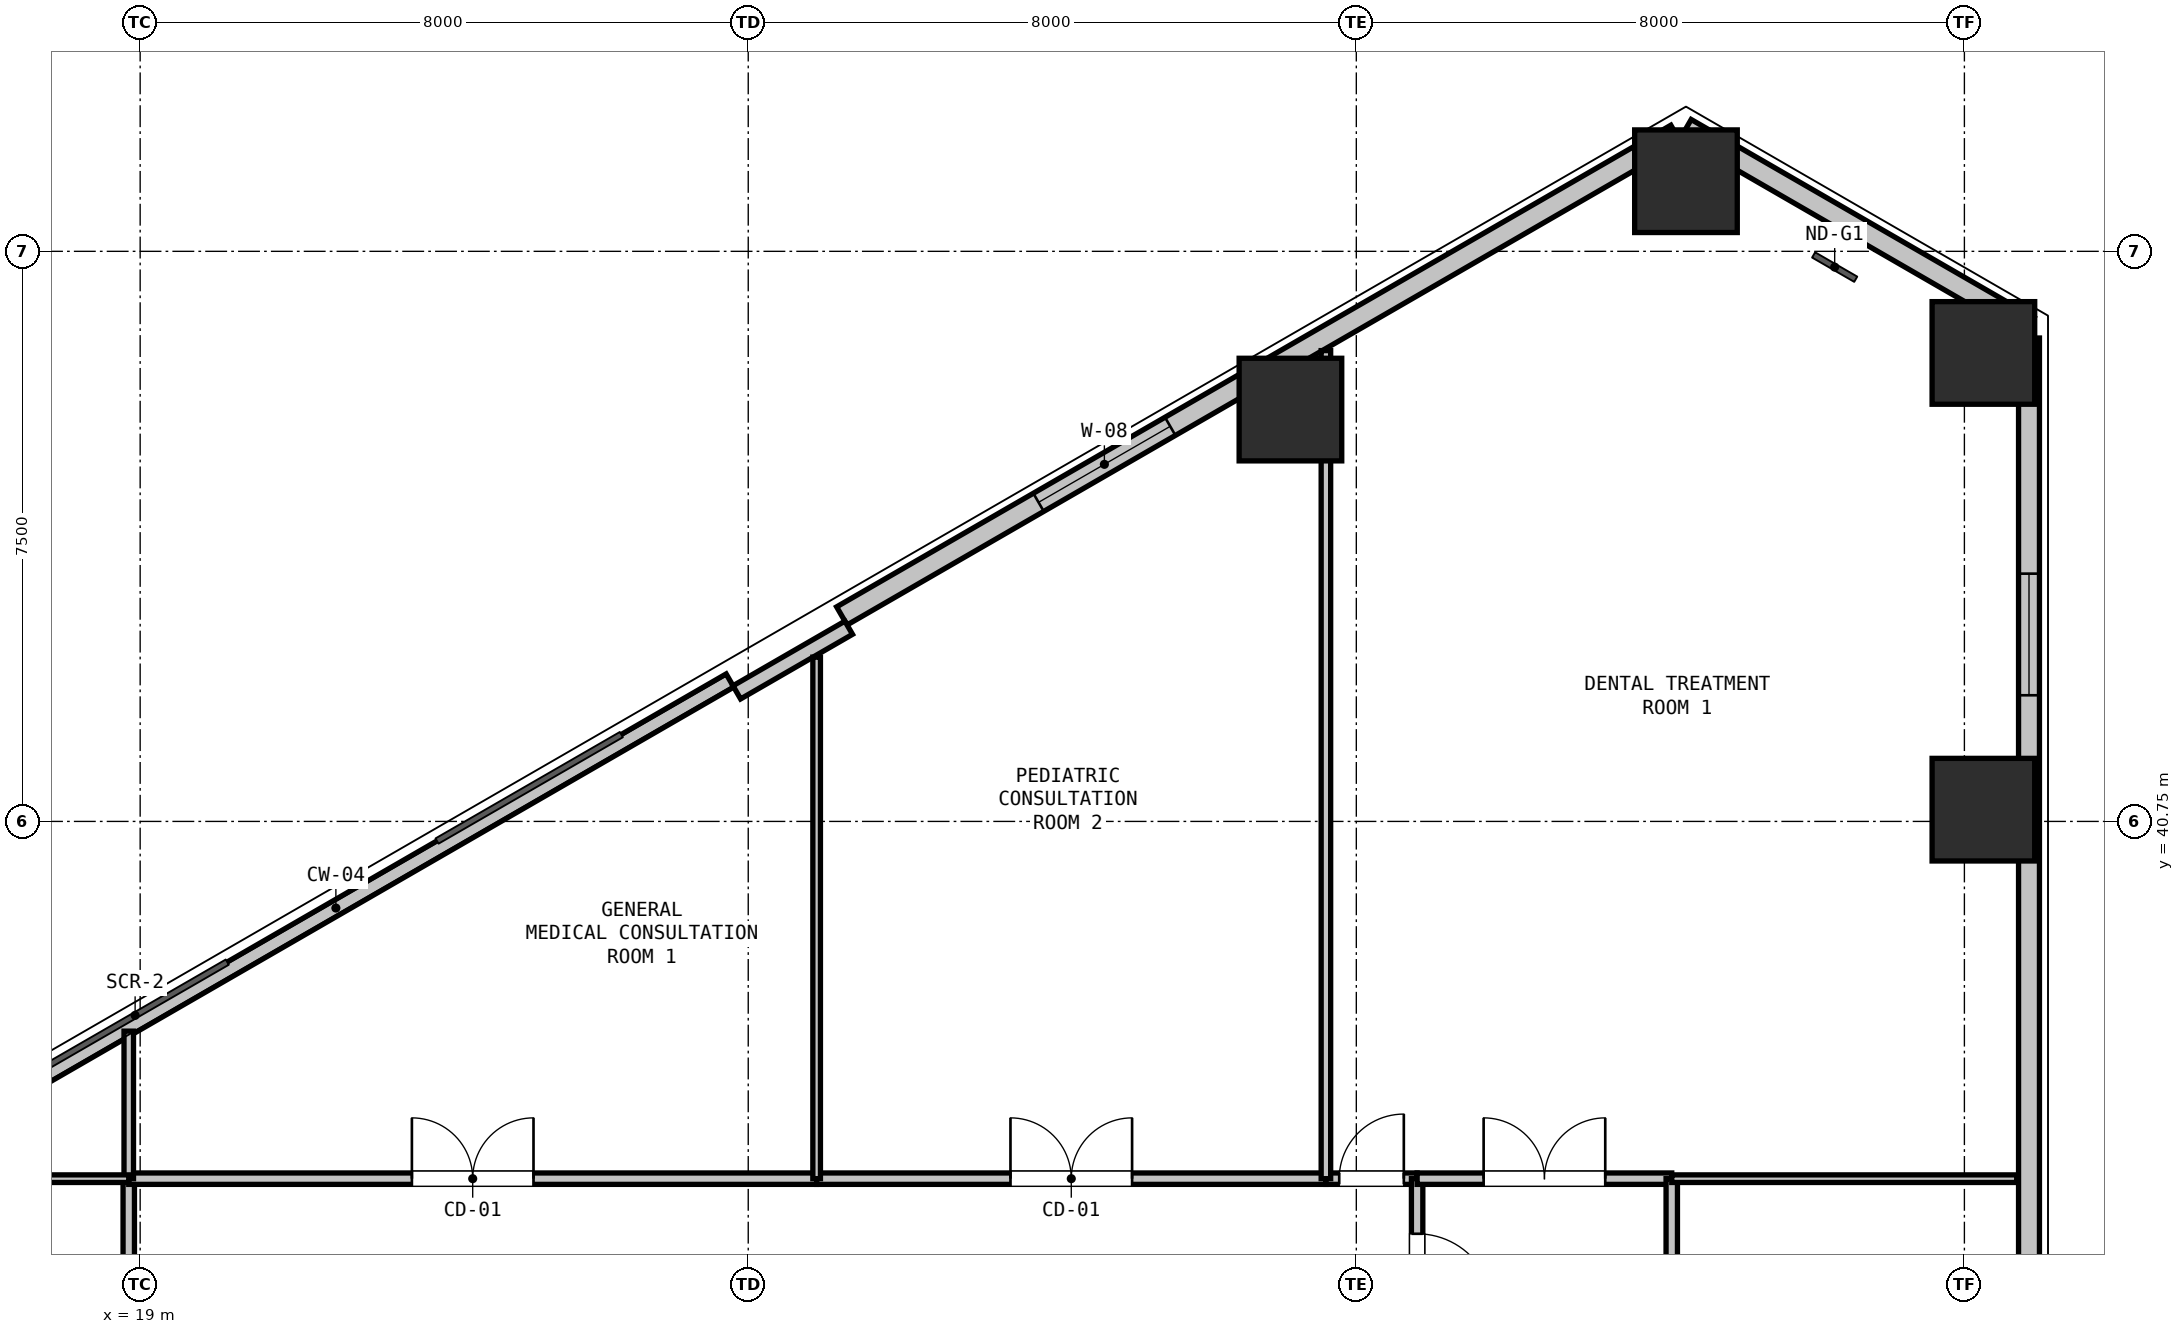
"""IFC4 building model, lengths in metres.
Left out: names, types, materials, properties, quantities, classifications, styles, units other than length and angle.
Written with IfcOpenShell. Run it as: python <this file> out.ifc"""

import sys

from ifc_helpers import new_model, si_unit, direction, frame, frame_2d, origin, origin_2d, place, context, subcontext, project, spatial, rectangle, hollow_rectangle, extrude, element, fill, save


model = new_model("IFC4")
c1 = context("Model", 3, precision=1e-05, world=origin(), true_north=direction((0.0, 1.0)))
c2 = subcontext(c1, "Body", "Model", "MODEL_VIEW")
j1 = project(units=[si_unit("LENGTHUNIT", "METRE"), si_unit("PLANEANGLEUNIT", "RADIAN")], contexts=[c1])
p1 = place(None, origin())
s1 = spatial("IfcSite", under=j1, at=p1, CompositionType="ELEMENT")
p2 = place(p1, origin())
s2 = spatial("IfcBuilding", under=s1, at=p2, CompositionType="ELEMENT")
p3 = place(p2, frame((0.0, 0.0, 14.4)))
s3 = spatial("IfcBuildingStorey", under=s2, at=p3, CompositionType="ELEMENT", Elevation=14.4)
for number, where, z_axis, x_axis in (
    (1, (34.133, 46.168, 0.0), (0.0, 0.0, 1.0), (1.0, 0.0, 0.0)),
    (2, (39.337, 49.173, 0.0), (0.0, 0.0, 1.0), (1.0, 0.0, 0.0)),
    (3, (43.25, 46.913, 0.0), (0.0, 0.0, 1.0), (1.0, 0.0, 0.0)),
    (4, (43.25, 40.905, 0.0), (0.0, 0.0, 1.0), (1.0, 0.0, 0.0)),
):
    element("IfcColumn", number, at=place(p3, frame(where, z_axis=z_axis, x_axis=x_axis)), inside=s3, PredefinedType="COLUMN", context=c2, shape_type="SweptSolid", body=[
        extrude(hollow_rectangle(XDim=1.35, YDim=1.35, WallThickness=0.036, at=origin_2d()), origin(), (0.0, 0.0, 1.0), 4.8),
    ])
p4 = place(p3, frame((39.337, 49.865, 0.0), z_axis=(0.0, 0.0, 1.0), x_axis=(0.866043601342, -0.499968479581, 0.0)))
e5 = element("IfcWall", 5, at=p4, inside=s3, PredefinedType="SOLIDWALL", context=c2, shape_type="SweptSolid", body=[
    extrude(rectangle(XDim=5.211, YDim=0.275, at=frame_2d((2.605, 0.0))), origin(), (0.0, 0.0, 1.0), 4.14),
])
p5 = place(p3, frame((16.39, 36.617, 0.0), z_axis=(0.0, 0.0, 1.0), x_axis=(0.866027351828, 0.499996625875, 0.0)))
e6 = element("IfcWall", 6, at=p5, inside=s3, PredefinedType="PARAPET", context=c2, shape_type="SweptSolid", body=[
    extrude(rectangle(XDim=11.973, YDim=0.2, at=frame_2d((5.987, 0.0))), origin(), (0.0, 0.0, 1.0), 0.2),
])
p6 = place(p3, frame((28.232, 43.454, 0.0), z_axis=(0.0, 0.0, 1.0), x_axis=(0.86603192154, 0.499988710747, 0.0)))
e7 = element("IfcWall", 7, at=p6, inside=s3, PredefinedType="SOLIDWALL", context=c2, shape_type="SweptSolid", body=[
    extrude(rectangle(XDim=12.673, YDim=0.275, at=frame_2d((6.336, 0.0))), origin(), (0.0, 0.0, 1.0), 4.14),
])
p7 = place(p6, frame((2.988, 0.0, 0.9)))
e8 = element("IfcOpeningElement", 8, at=p7, cuts=e7, PredefinedType="OPENING", context=c2, shape_type="SweptSolid", body=[
    extrude(rectangle(XDim=2.0, YDim=1.8, at=frame_2d((1.0, 0.9))), frame((0.0, 0.147, 0.0), z_axis=(0.0, -1.0, 0.0), x_axis=(1.0, 0.0, 0.0)), (0.0, 0.0, 1.0), 0.295),
])
p8 = place(p3, frame((26.85, 42.448, 0.0), z_axis=(0.0, 0.0, 1.0), x_axis=(0.86605165483, 0.499954529098, 0.0)))
e9 = element("IfcWall", 9, at=p8, inside=s3, PredefinedType="PARAPET", context=c2, shape_type="SweptSolid", body=[
    extrude(rectangle(XDim=1.7, YDim=0.2, at=frame_2d((0.85, 0.0))), origin(), (0.0, 0.0, 1.0), 4.14),
])
p9 = place(p3, frame((43.85, 47.11, 0.0), z_axis=(0.0, 0.0, 1.0), x_axis=(0.0, -1.0, 0.0)))
e10 = element("IfcWall", 10, at=p9, inside=s3, PredefinedType="SOLIDWALL", context=c2, shape_type="SweptSolid", body=[
    extrude(rectangle(XDim=12.673, YDim=0.275, at=frame_2d((6.336, 0.0))), origin(), (0.0, 0.0, 1.0), 4.14),
])
p10 = place(p9, frame((3.1, 0.0, 0.9)))
e11 = element("IfcOpeningElement", 11, at=p10, cuts=e10, PredefinedType="OPENING", context=c2, shape_type="SweptSolid", body=[
    extrude(rectangle(XDim=1.6, YDim=1.8, at=frame_2d((0.8, 0.9))), frame((0.0, 0.147, 0.0), z_axis=(0.0, -1.0, 0.0), x_axis=(1.0, 0.0, 0.0)), (0.0, 0.0, 1.0), 0.295),
])
p11 = place(p3, frame((18.85, 27.2, 0.0), z_axis=(0.0, 0.0, 1.0), x_axis=(0.0, 1.0, 0.0)))
e12 = element("IfcWall", 12, at=p11, inside=s3, PredefinedType="PARTITIONING", context=c2, shape_type="SweptSolid", body=[
    extrude(rectangle(XDim=8.85, YDim=0.15, at=frame_2d((4.425, 0.0))), origin(), (0.0, 0.0, 1.0), 3.818),
])
p12 = place(p11, frame((3.925, 0.0, 0.0)))
e13 = element("IfcOpeningElement", 13, at=p12, cuts=e12, PredefinedType="OPENING", context=c2, shape_type="SweptSolid", body=[
    extrude(rectangle(XDim=1.0, YDim=2.15, at=frame_2d((0.5, 1.075))), frame((0.0, 0.085, 0.0), z_axis=(0.0, -1.0, 0.0), x_axis=(1.0, 0.0, 0.0)), (0.0, 0.0, 1.0), 0.17),
])
p13 = place(p3, frame((18.85, 36.05, 0.0), z_axis=(0.0, 0.0, 1.0), x_axis=(1.0, 0.0, 0.0)))
e14 = element("IfcWall", 14, at=p13, inside=s3, PredefinedType="PARTITIONING", context=c2, shape_type="SweptSolid", body=[
    extrude(rectangle(XDim=9.05, YDim=0.15, at=frame_2d((4.525, 0.0))), origin(), (0.0, 0.0, 1.0), 4.52),
])
p14 = place(p13, frame((3.725, 0.0, 0.0)))
e15 = element("IfcOpeningElement", 15, at=p14, cuts=e14, PredefinedType="OPENING", context=c2, shape_type="SweptSolid", body=[
    extrude(rectangle(XDim=1.6, YDim=2.2, at=frame_2d((0.8, 1.1))), frame((0.0, 0.085, 0.0), z_axis=(0.0, -1.0, 0.0), x_axis=(1.0, 0.0, 0.0)), (0.0, 0.0, 1.0), 0.17),
])
p15 = place(p3, frame((27.9, 36.05, 0.0), z_axis=(0.0, 0.0, 1.0), x_axis=(1.0, 0.0, 0.0)))
e16 = element("IfcWall", 16, at=p15, inside=s3, PredefinedType="PARTITIONING", context=c2, shape_type="SweptSolid", body=[
    extrude(rectangle(XDim=6.7, YDim=0.15, at=frame_2d((3.35, 0.0))), origin(), (0.0, 0.0, 1.0), 4.52),
])
p16 = place(p15, frame((2.55, 0.0, 0.0)))
e17 = element("IfcOpeningElement", 17, at=p16, cuts=e16, PredefinedType="OPENING", context=c2, shape_type="SweptSolid", body=[
    extrude(rectangle(XDim=1.6, YDim=2.2, at=frame_2d((0.8, 1.1))), frame((0.0, 0.085, 0.0), z_axis=(0.0, -1.0, 0.0), x_axis=(1.0, 0.0, 0.0)), (0.0, 0.0, 1.0), 0.17),
])
p17 = place(p3, frame((34.6, 36.05, 0.0), z_axis=(0.0, 0.0, 1.0), x_axis=(1.0, 0.0, 0.0)))
e18 = element("IfcWall", 18, at=p17, inside=s3, PredefinedType="PARTITIONING", context=c2, shape_type="SweptSolid", body=[
    extrude(rectangle(XDim=1.2, YDim=0.15, at=frame_2d((0.6, 0.0))), origin(), (0.0, 0.0, 1.0), 4.52),
])
p18 = place(p17, frame((0.175, 0.0, 0.0)))
e19 = element("IfcOpeningElement", 19, at=p18, cuts=e18, PredefinedType="OPENING", context=c2, shape_type="SweptSolid", body=[
    extrude(rectangle(XDim=0.85, YDim=2.1, at=frame_2d((0.425, 1.05))), frame((0.0, 0.085, 0.0), z_axis=(0.0, -1.0, 0.0), x_axis=(1.0, 0.0, 0.0)), (0.0, 0.0, 1.0), 0.17),
])
p19 = place(p3, frame((35.8, 36.05, 0.0), z_axis=(0.0, 0.0, 1.0), x_axis=(0.0, -1.0, 0.0)))
e20 = element("IfcWall", 20, at=p19, inside=s3, PredefinedType="PARTITIONING", context=c2, shape_type="SweptSolid", body=[
    extrude(rectangle(XDim=2.45, YDim=0.15, at=frame_2d((1.225, 0.0))), origin(), (0.0, 0.0, 1.0), 4.52),
])
p20 = place(p19, frame((0.725, 0.0, 0.0)))
e21 = element("IfcOpeningElement", 21, at=p20, cuts=e20, PredefinedType="OPENING", context=c2, shape_type="SweptSolid", body=[
    extrude(rectangle(XDim=1.0, YDim=2.15, at=frame_2d((0.5, 1.075))), frame((0.0, 0.085, 0.0), z_axis=(0.0, -1.0, 0.0), x_axis=(1.0, 0.0, 0.0)), (0.0, 0.0, 1.0), 0.17),
])
p21 = place(p3, frame((35.8, 36.05, 0.0), z_axis=(0.0, 0.0, 1.0), x_axis=(1.0, 0.0, 0.0)))
e22 = element("IfcWall", 22, at=p21, inside=s3, PredefinedType="PARTITIONING", context=c2, shape_type="SweptSolid", body=[
    extrude(rectangle(XDim=3.35, YDim=0.15, at=frame_2d((1.675, 0.0))), origin(), (0.0, 0.0, 1.0), 3.818),
])
p22 = place(p21, frame((0.875, 0.0, 0.0)))
e23 = element("IfcOpeningElement", 23, at=p22, cuts=e22, PredefinedType="OPENING", context=c2, shape_type="SweptSolid", body=[
    extrude(rectangle(XDim=1.6, YDim=2.2, at=frame_2d((0.8, 1.1))), frame((0.0, 0.085, 0.0), z_axis=(0.0, -1.0, 0.0), x_axis=(1.0, 0.0, 0.0)), (0.0, 0.0, 1.0), 0.17),
])
p23 = place(p3, frame((39.15, 36.05, 0.0), z_axis=(0.0, 0.0, 1.0), x_axis=(0.0, -1.0, 0.0)))
e24 = element("IfcWall", 24, at=p23, inside=s3, PredefinedType="PARTITIONING", context=c2, shape_type="SweptSolid", body=[
    extrude(rectangle(XDim=9.3, YDim=0.15, at=frame_2d((4.65, 0.0))), origin(), (0.0, 0.0, 1.0), 4.52),
])
p24 = place(p23, frame((4.15, 0.0, 0.0)))
e25 = element("IfcOpeningElement", 25, at=p24, cuts=e24, PredefinedType="OPENING", context=c2, shape_type="SweptSolid", body=[
    extrude(rectangle(XDim=1.0, YDim=2.15, at=frame_2d((0.5, 1.075))), frame((0.0, 0.085, 0.0), z_axis=(0.0, -1.0, 0.0), x_axis=(1.0, 0.0, 0.0)), (0.0, 0.0, 1.0), 0.17),
])
p25 = place(p3, frame((18.85, 36.05, 0.0), z_axis=(0.0, 0.0, 1.0), x_axis=(0.0, 1.0, 0.0)))
e26 = element("IfcWall", 26, at=p25, inside=s3, PredefinedType="PARTITIONING", context=c2, shape_type="SweptSolid", body=[
    extrude(rectangle(XDim=1.941, YDim=0.125, at=frame_2d((0.97, 0.0))), origin(), (0.0, 0.0, 1.0), 4.131),
])
p26 = place(p3, frame((27.9, 42.911, 0.0), z_axis=(0.0, 0.0, 1.0), x_axis=(0.0, -1.0, 0.0)))
e27 = element("IfcWall", 27, at=p26, inside=s3, PredefinedType="PARTITIONING", context=c2, shape_type="SweptSolid", body=[
    extrude(rectangle(XDim=6.861, YDim=0.1, at=frame_2d((3.431, 0.0))), origin(), (0.0, 0.0, 1.0), 4.131),
])
p27 = place(p3, frame((34.6, 46.944, 0.0), z_axis=(0.0, 0.0, 1.0), x_axis=(0.0, -1.0, 0.0)))
e28 = element("IfcWall", 28, at=p27, inside=s3, PredefinedType="PARTITIONING", context=c2, shape_type="SweptSolid", body=[
    extrude(rectangle(XDim=10.894, YDim=0.125, at=frame_2d((5.447, 0.0))), origin(), (0.0, 0.0, 1.0), 4.131),
])
p28 = place(p3, frame((43.688, 36.05, 0.0), z_axis=(0.0, 0.0, 1.0), x_axis=(-1.0, 0.0, 0.0)))
e29 = element("IfcWall", 29, at=p28, inside=s3, PredefinedType="PARTITIONING", context=c2, shape_type="SweptSolid", body=[
    extrude(rectangle(XDim=4.539, YDim=0.1, at=frame_2d((2.269, 0.0))), origin(), (0.0, 0.0, 1.0), 4.131),
])
p29 = place(p3, frame((15.993, 36.05, 0.0), z_axis=(0.0, 0.0, 1.0), x_axis=(1.0, 0.0, 0.0)))
e30 = element("IfcWall", 30, at=p29, inside=s3, PredefinedType="PARTITIONING", context=c2, shape_type="SweptSolid", body=[
    extrude(rectangle(XDim=2.857, YDim=0.1, at=frame_2d((1.428, 0.0))), origin(), (0.0, 0.0, 1.0), 4.131),
])
p30 = place(p7, origin())
e31 = element("IfcWindow", 31, at=p30, inside=s3, PartitioningType="SINGLE_PANEL", PredefinedType="WINDOW", context=c2, shape_type="SweptSolid", body=[
    extrude(rectangle(XDim=2.0, YDim=1.8, at=frame_2d((1.0, 0.9))), frame((0.0, 0.03, 0.0), z_axis=(0.0, -1.0, 0.0), x_axis=(1.0, 0.0, 0.0)), (0.0, 0.0, 1.0), 0.06),
])
fill(e8, e31)
p31 = place(p10, origin())
e32 = element("IfcWindow", 32, at=p31, inside=s3, PartitioningType="SINGLE_PANEL", PredefinedType="WINDOW", context=c2, shape_type="SweptSolid", body=[
    extrude(rectangle(XDim=1.6, YDim=1.8, at=frame_2d((0.8, 0.9))), frame((0.0, 0.03, 0.0), z_axis=(0.0, -1.0, 0.0), x_axis=(1.0, 0.0, 0.0)), (0.0, 0.0, 1.0), 0.06),
])
fill(e11, e32)
p32 = place(p20, origin())
e33 = element("IfcDoor", 33, at=p32, inside=s3, OperationType="SINGLE_SWING_RIGHT", PredefinedType="DOOR", context=c2, shape_type="SweptSolid", body=[
    extrude(rectangle(XDim=1.0, YDim=2.15, at=frame_2d((0.5, 1.075))), frame((0.0, 0.025, 0.0), z_axis=(0.0, -1.0, 0.0), x_axis=(1.0, 0.0, 0.0)), (0.0, 0.0, 1.0), 0.05),
])
fill(e21, e33)
p33 = place(p14, origin())
e34 = element("IfcDoor", 34, at=p33, inside=s3, OperationType="DOUBLE_DOOR_SINGLE_SWING", PredefinedType="DOOR", context=c2, shape_type="SweptSolid", body=[
    extrude(rectangle(XDim=1.6, YDim=2.2, at=frame_2d((0.8, 1.1))), frame((0.0, 0.025, 0.0), z_axis=(0.0, -1.0, 0.0), x_axis=(1.0, 0.0, 0.0)), (0.0, 0.0, 1.0), 0.05),
])
fill(e15, e34)
p34 = place(p16, origin())
e35 = element("IfcDoor", 35, at=p34, inside=s3, OperationType="DOUBLE_DOOR_SINGLE_SWING", PredefinedType="DOOR", context=c2, shape_type="SweptSolid", body=[
    extrude(rectangle(XDim=1.6, YDim=2.2, at=frame_2d((0.8, 1.1))), frame((0.0, 0.025, 0.0), z_axis=(0.0, -1.0, 0.0), x_axis=(1.0, 0.0, 0.0)), (0.0, 0.0, 1.0), 0.05),
])
fill(e17, e35)
p35 = place(p18, origin())
e36 = element("IfcDoor", 36, at=p35, inside=s3, OperationType="SINGLE_SWING_RIGHT", PredefinedType="DOOR", context=c2, shape_type="SweptSolid", body=[
    extrude(rectangle(XDim=0.85, YDim=2.1, at=frame_2d((0.425, 1.05))), frame((0.0, 0.025, 0.0), z_axis=(0.0, -1.0, 0.0), x_axis=(1.0, 0.0, 0.0)), (0.0, 0.0, 1.0), 0.05),
])
fill(e19, e36)
p36 = place(p22, origin())
e37 = element("IfcDoor", 37, at=p36, inside=s3, OperationType="DOUBLE_DOOR_SINGLE_SWING", PredefinedType="DOOR", context=c2, shape_type="SweptSolid", body=[
    extrude(rectangle(XDim=1.6, YDim=2.2, at=frame_2d((0.8, 1.1))), frame((0.0, 0.025, 0.0), z_axis=(0.0, -1.0, 0.0), x_axis=(1.0, 0.0, 0.0)), (0.0, 0.0, 1.0), 0.05),
])
fill(e23, e37)
save(model, sys.argv[1])
